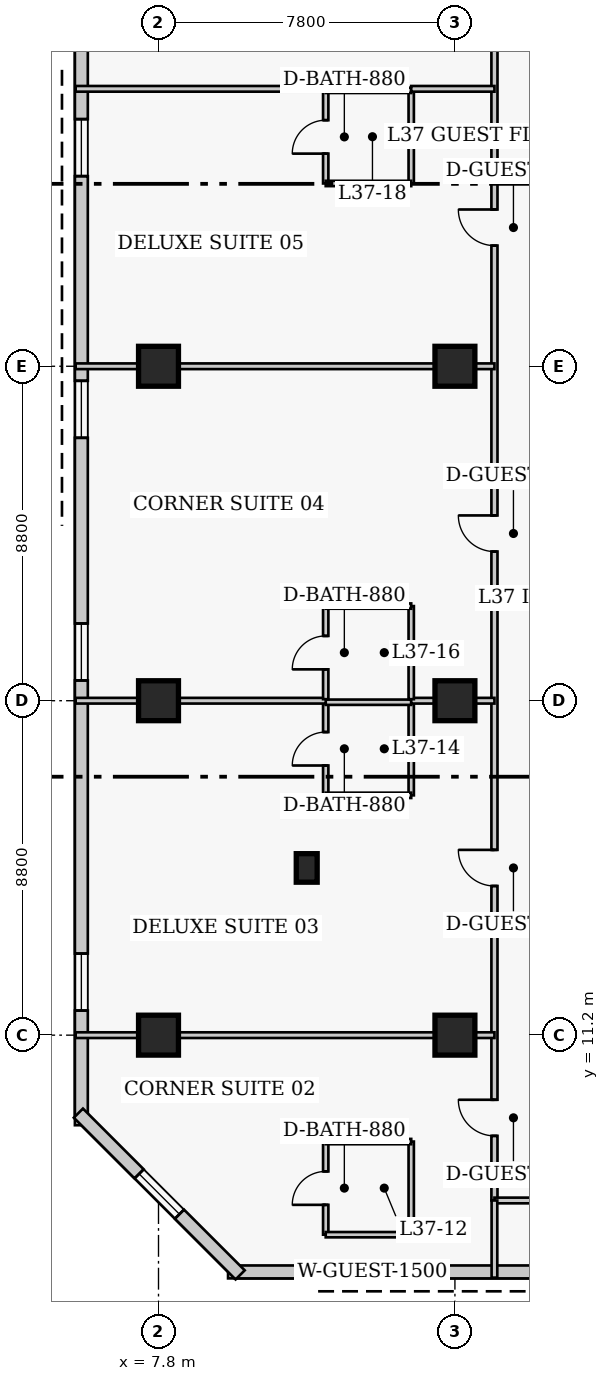
"""IFC4 building model, lengths in metres.
Left out: names, types, materials, properties, quantities, classifications, styles, units other than length and angle.
Written with IfcOpenShell. Run it as: python <this file> out.ifc"""

import sys

from ifc_helpers import new_model, si_unit, direction, frame, frame_2d, origin, origin_2d, place, context, subcontext, project, spatial, rectangle, extrude, element, fill, save


model = new_model("IFC4")
c1 = context("Model", 3, precision=1e-05, world=origin(), true_north=direction((0.0, 1.0)))
c2 = subcontext(c1, "Body", "Model", "MODEL_VIEW")
j1 = project(units=[si_unit("LENGTHUNIT", "METRE"), si_unit("PLANEANGLEUNIT", "RADIAN")], contexts=[c1])
p1 = place(None, origin())
s1 = spatial("IfcSite", under=j1, at=p1, CompositionType="ELEMENT")
p2 = place(p1, origin())
s2 = spatial("IfcBuilding", under=s1, at=p2, CompositionType="ELEMENT")
p3 = place(p2, frame((0.0, 0.0, 149.8)))
s3 = spatial("IfcBuildingStorey", under=s2, at=p3, CompositionType="ELEMENT", Elevation=149.8)
for number, where, z_axis, x_axis in (
    (1, (7.8, 11.2, 0.0), (0.0, 0.0, 1.0), (1.0, 0.0, 0.0)),
    (2, (7.8, 20.0, 0.0), (0.0, 0.0, 1.0), (1.0, 0.0, 0.0)),
    (3, (7.8, 28.8, 0.0), (0.0, 0.0, 1.0), (1.0, 0.0, 0.0)),
    (4, (15.6, 11.2, 0.0), (0.0, 0.0, 1.0), (1.0, 0.0, 0.0)),
    (5, (15.6, 20.0, 0.0), (0.0, 0.0, 1.0), (1.0, 0.0, 0.0)),
    (6, (15.6, 28.8, 0.0), (0.0, 0.0, 1.0), (1.0, 0.0, 0.0)),
):
    element("IfcColumn", number, at=place(p3, frame(where, z_axis=z_axis, x_axis=x_axis)), inside=s3, PredefinedType="COLUMN", context=c2, shape_type="SweptSolid", body=[
        extrude(rectangle(XDim=1.05, YDim=1.05, at=origin_2d()), origin(), (0.0, 0.0, 1.0), 3.8),
    ])
p4 = place(p3, frame((11.7, 15.6, 0.0), z_axis=(0.0, 0.0, 1.0), x_axis=(1.0, 0.0, 0.0)))
e7 = element("IfcColumn", 7, at=p4, inside=s3, PredefinedType="PILASTER", context=c2, shape_type="SweptSolid", body=[
    extrude(rectangle(XDim=0.55, YDim=0.75, at=origin_2d()), origin(), (0.0, 0.0, 1.0), 3.8),
])
p5 = place(p3, frame((9.63, 4.97, 0.0), z_axis=(0.0, 0.0, 1.0), x_axis=(1.0, 0.0, 0.0)))
e8 = element("IfcWall", 8, at=p5, inside=s3, PredefinedType="SOLIDWALL", context=c2, shape_type="SweptSolid", body=[
    extrude(rectangle(XDim=26.69, YDim=0.34, at=frame_2d((13.345, 0.0))), origin(), (0.0, 0.0, 1.0), 3.55),
])
p6 = place(p5, frame((3.048, 0.0, 0.85)))
e9 = element("IfcOpeningElement", 9, at=p6, cuts=e8, PredefinedType="OPENING", context=c2, shape_type="SweptSolid", body=[
    extrude(rectangle(XDim=1.5, YDim=1.75, at=frame_2d((0.75, 0.875))), frame((0.0, 0.18, 0.0), z_axis=(0.0, -1.0, 0.0), x_axis=(1.0, 0.0, 0.0)), (0.0, 0.0, 1.0), 0.36),
])
p7 = place(p5, frame((22.642, 0.0, 0.85)))
e10 = element("IfcOpeningElement", 10, at=p7, cuts=e8, PredefinedType="OPENING", context=c2, shape_type="SweptSolid", body=[
    extrude(rectangle(XDim=1.5, YDim=1.75, at=frame_2d((0.75, 0.875))), frame((0.0, 0.18, 0.0), z_axis=(0.0, -1.0, 0.0), x_axis=(1.0, 0.0, 0.0)), (0.0, 0.0, 1.0), 0.36),
])
p8 = place(p3, frame((5.77, 38.97, 0.0), z_axis=(0.0, 0.0, 1.0), x_axis=(0.0, -1.0, 0.0)))
e11 = element("IfcWall", 11, at=p8, inside=s3, PredefinedType="SOLIDWALL", context=c2, shape_type="SweptSolid", body=[
    extrude(rectangle(XDim=30.14, YDim=0.34, at=frame_2d((15.07, 0.0))), origin(), (0.0, 0.0, 1.0), 3.55),
])
p9 = place(p8, frame((3.667, 0.0, 0.85)))
e12 = element("IfcOpeningElement", 12, at=p9, cuts=e11, PredefinedType="OPENING", context=c2, shape_type="SweptSolid", body=[
    extrude(rectangle(XDim=1.5, YDim=1.75, at=frame_2d((0.75, 0.875))), frame((0.0, 0.18, 0.0), z_axis=(0.0, -1.0, 0.0), x_axis=(1.0, 0.0, 0.0)), (0.0, 0.0, 1.0), 0.36),
])
p10 = place(p8, frame((10.552, 0.0, 0.85)))
e13 = element("IfcOpeningElement", 13, at=p10, cuts=e11, PredefinedType="OPENING", context=c2, shape_type="SweptSolid", body=[
    extrude(rectangle(XDim=1.5, YDim=1.75, at=frame_2d((0.75, 0.875))), frame((0.0, 0.18, 0.0), z_axis=(0.0, -1.0, 0.0), x_axis=(1.0, 0.0, 0.0)), (0.0, 0.0, 1.0), 0.36),
])
p11 = place(p8, frame((16.938, 0.0, 0.85)))
e14 = element("IfcOpeningElement", 14, at=p11, cuts=e11, PredefinedType="OPENING", context=c2, shape_type="SweptSolid", body=[
    extrude(rectangle(XDim=1.5, YDim=1.75, at=frame_2d((0.75, 0.875))), frame((0.0, 0.18, 0.0), z_axis=(0.0, -1.0, 0.0), x_axis=(1.0, 0.0, 0.0)), (0.0, 0.0, 1.0), 0.36),
])
p12 = place(p8, frame((25.623, 0.0, 0.85)))
e15 = element("IfcOpeningElement", 15, at=p12, cuts=e11, PredefinedType="OPENING", context=c2, shape_type="SweptSolid", body=[
    extrude(rectangle(XDim=1.5, YDim=1.75, at=frame_2d((0.75, 0.875))), frame((0.0, 0.18, 0.0), z_axis=(0.0, -1.0, 0.0), x_axis=(1.0, 0.0, 0.0)), (0.0, 0.0, 1.0), 0.36),
])
p13 = place(p3, frame((5.692, 9.148, 0.0), z_axis=(0.0, 0.0, 1.0), x_axis=(0.707106781187, -0.707106781187, 0.0)))
e16 = element("IfcWall", 16, at=p13, inside=s3, PredefinedType="SOLIDWALL", context=c2, shape_type="SweptSolid", body=[
    extrude(rectangle(XDim=6.02, YDim=0.34, at=frame_2d((3.01, 0.0))), origin(), (0.0, 0.0, 1.0), 3.55),
])
p14 = place(p13, frame((2.26, 0.0, 0.85)))
e17 = element("IfcOpeningElement", 17, at=p14, cuts=e16, PredefinedType="OPENING", context=c2, shape_type="SweptSolid", body=[
    extrude(rectangle(XDim=1.5, YDim=1.75, at=frame_2d((0.75, 0.875))), frame((0.0, 0.18, 0.0), z_axis=(0.0, -1.0, 0.0), x_axis=(1.0, 0.0, 0.0)), (0.0, 0.0, 1.0), 0.36),
])
p15 = place(p3, frame((16.64, 6.85, 0.0), z_axis=(0.0, 0.0, 1.0), x_axis=(0.0, 1.0, 0.0)))
e18 = element("IfcWall", 18, at=p15, inside=s3, PredefinedType="PARTITIONING", context=c2, shape_type="SweptSolid", body=[
    extrude(rectangle(XDim=33.8, YDim=0.16, at=frame_2d((16.9, 0.0))), origin(), (0.0, 0.0, 1.0), 3.55),
])
p16 = place(p15, frame((1.7, 0.0, 0.0)))
e19 = element("IfcOpeningElement", 19, at=p16, cuts=e18, PredefinedType="OPENING", context=c2, shape_type="SweptSolid", body=[
    extrude(rectangle(XDim=0.95, YDim=2.1, at=frame_2d((0.475, 1.05))), frame((0.0, 0.09, 0.0), z_axis=(0.0, -1.0, 0.0), x_axis=(1.0, 0.0, 0.0)), (0.0, 0.0, 1.0), 0.18),
])
p17 = place(p15, frame((8.275, 0.0, 0.0)))
e20 = element("IfcOpeningElement", 20, at=p17, cuts=e18, PredefinedType="OPENING", context=c2, shape_type="SweptSolid", body=[
    extrude(rectangle(XDim=0.95, YDim=2.1, at=frame_2d((0.475, 1.05))), frame((0.0, 0.09, 0.0), z_axis=(0.0, -1.0, 0.0), x_axis=(1.0, 0.0, 0.0)), (0.0, 0.0, 1.0), 0.18),
])
p18 = place(p15, frame((17.075, 0.0, 0.0)))
e21 = element("IfcOpeningElement", 21, at=p18, cuts=e18, PredefinedType="OPENING", context=c2, shape_type="SweptSolid", body=[
    extrude(rectangle(XDim=0.95, YDim=2.1, at=frame_2d((0.475, 1.05))), frame((0.0, 0.09, 0.0), z_axis=(0.0, -1.0, 0.0), x_axis=(1.0, 0.0, 0.0)), (0.0, 0.0, 1.0), 0.18),
])
p19 = place(p15, frame((25.125, 0.0, 0.0)))
e22 = element("IfcOpeningElement", 22, at=p19, cuts=e18, PredefinedType="OPENING", context=c2, shape_type="SweptSolid", body=[
    extrude(rectangle(XDim=0.95, YDim=2.1, at=frame_2d((0.475, 1.05))), frame((0.0, 0.09, 0.0), z_axis=(0.0, -1.0, 0.0), x_axis=(1.0, 0.0, 0.0)), (0.0, 0.0, 1.0), 0.18),
])
p20 = place(p15, frame((32.36, 0.0, 0.0)))
e23 = element("IfcOpeningElement", 23, at=p20, cuts=e18, PredefinedType="OPENING", context=c2, shape_type="SweptSolid", body=[
    extrude(rectangle(XDim=1.0, YDim=2.15, at=frame_2d((0.5, 1.075))), frame((0.0, 0.09, 0.0), z_axis=(0.0, -1.0, 0.0), x_axis=(1.0, 0.0, 0.0)), (0.0, 0.0, 1.0), 0.18),
])
p21 = place(p3, frame((16.64, 6.85, 0.0), z_axis=(0.0, 0.0, 1.0), x_axis=(1.0, 0.0, 0.0)))
e24 = element("IfcWall", 24, at=p21, inside=s3, PredefinedType="PARTITIONING", context=c2, shape_type="SweptSolid", body=[
    extrude(rectangle(XDim=2.22, YDim=0.15, at=frame_2d((1.11, 0.0))), origin(), (0.0, 0.0, 1.0), 3.55),
])
p22 = place(p3, frame((16.64, 4.82, 0.0), z_axis=(0.0, 0.0, 1.0), x_axis=(0.0, 1.0, 0.0)))
e25 = element("IfcWall", 25, at=p22, inside=s3, PredefinedType="PARTITIONING", context=c2, shape_type="SweptSolid", body=[
    extrude(rectangle(XDim=2.03, YDim=0.15, at=frame_2d((1.015, 0.0))), origin(), (0.0, 0.0, 1.0), 3.55),
])
p23 = place(p3, frame((12.2, 5.95, 0.0), z_axis=(0.0, 0.0, 1.0), x_axis=(0.0, 1.0, 0.0)))
e26 = element("IfcWall", 26, at=p23, inside=s3, PredefinedType="PLUMBINGWALL", context=c2, shape_type="SweptSolid", body=[
    extrude(rectangle(XDim=2.45, YDim=0.14, at=frame_2d((1.225, 0.0))), origin(), (0.0, 0.0, 1.0), 3.55),
])
p24 = place(p23, frame((0.785, 0.0, 0.0)))
e27 = element("IfcOpeningElement", 27, at=p24, cuts=e26, PredefinedType="OPENING", context=c2, shape_type="SweptSolid", body=[
    extrude(rectangle(XDim=0.88, YDim=2.05, at=frame_2d((0.44, 1.025))), frame((0.0, 0.08, 0.0), z_axis=(0.0, -1.0, 0.0), x_axis=(1.0, 0.0, 0.0)), (0.0, 0.0, 1.0), 0.16),
])
p25 = place(p3, frame((14.45, 5.95, 0.0), z_axis=(0.0, 0.0, 1.0), x_axis=(0.0, 1.0, 0.0)))
e28 = element("IfcWall", 28, at=p25, inside=s3, PredefinedType="PLUMBINGWALL", context=c2, shape_type="SweptSolid", body=[
    extrude(rectangle(XDim=2.45, YDim=0.14, at=frame_2d((1.225, 0.0))), origin(), (0.0, 0.0, 1.0), 3.55),
])
for number, where, z_axis, x_axis in (
    (29, (12.2, 5.95, 0.0), (0.0, 0.0, 1.0), (1.0, 0.0, 0.0)),
    (30, (12.2, 8.4, 0.0), (0.0, 0.0, 1.0), (1.0, 0.0, 0.0)),
):
    element("IfcWall", number, at=place(p3, frame(where, z_axis=z_axis, x_axis=x_axis)), inside=s3, PredefinedType="PLUMBINGWALL", context=c2, shape_type="SweptSolid", body=[
        extrude(rectangle(XDim=2.25, YDim=0.14, at=frame_2d((1.125, 0.0))), origin(), (0.0, 0.0, 1.0), 3.55),
    ])
p26 = place(p3, frame((5.62, 11.2, 0.0), z_axis=(0.0, 0.0, 1.0), x_axis=(1.0, 0.0, 0.0)))
e31 = element("IfcWall", 31, at=p26, inside=s3, PredefinedType="PARTITIONING", context=c2, shape_type="SweptSolid", body=[
    extrude(rectangle(XDim=11.02, YDim=0.15, at=frame_2d((5.51, 0.0))), origin(), (0.0, 0.0, 1.0), 2.778),
])
p27 = place(p3, frame((12.2, 17.51, 0.0), z_axis=(0.0, 0.0, 1.0), x_axis=(0.0, 1.0, 0.0)))
e32 = element("IfcWall", 32, at=p27, inside=s3, PredefinedType="PLUMBINGWALL", context=c2, shape_type="SweptSolid", body=[
    extrude(rectangle(XDim=2.45, YDim=0.14, at=frame_2d((1.225, 0.0))), origin(), (0.0, 0.0, 1.0), 3.55),
])
p28 = place(p27, frame((0.785, 0.0, 0.0)))
e33 = element("IfcOpeningElement", 33, at=p28, cuts=e32, PredefinedType="OPENING", context=c2, shape_type="SweptSolid", body=[
    extrude(rectangle(XDim=0.88, YDim=2.05, at=frame_2d((0.44, 1.025))), frame((0.0, 0.08, 0.0), z_axis=(0.0, -1.0, 0.0), x_axis=(1.0, 0.0, 0.0)), (0.0, 0.0, 1.0), 0.16),
])
p29 = place(p3, frame((14.45, 17.51, 0.0), z_axis=(0.0, 0.0, 1.0), x_axis=(0.0, 1.0, 0.0)))
e34 = element("IfcWall", 34, at=p29, inside=s3, PredefinedType="PLUMBINGWALL", context=c2, shape_type="SweptSolid", body=[
    extrude(rectangle(XDim=2.45, YDim=0.14, at=frame_2d((1.225, 0.0))), origin(), (0.0, 0.0, 1.0), 3.55),
])
p30 = place(p3, frame((12.2, 17.51, 0.0), z_axis=(0.0, 0.0, 1.0), x_axis=(1.0, 0.0, 0.0)))
e35 = element("IfcWall", 35, at=p30, inside=s3, PredefinedType="PLUMBINGWALL", context=c2, shape_type="SweptSolid", body=[
    extrude(rectangle(XDim=2.25, YDim=0.14, at=frame_2d((1.125, 0.0))), origin(), (0.0, 0.0, 1.0), 3.55),
])
p31 = place(p3, frame((12.2, 19.96, 0.0), z_axis=(0.0, 0.0, 1.0), x_axis=(1.0, 0.0, 0.0)))
e36 = element("IfcWall", 36, at=p31, inside=s3, PredefinedType="PLUMBINGWALL", context=c2, shape_type="SweptSolid", body=[
    extrude(rectangle(XDim=2.25, YDim=0.14, at=frame_2d((1.125, 0.0))), origin(), (0.0, 0.0, 1.0), 2.9),
])
p32 = place(p3, frame((5.62, 20.0, 0.0), z_axis=(0.0, 0.0, 1.0), x_axis=(1.0, 0.0, 0.0)))
e37 = element("IfcWall", 37, at=p32, inside=s3, PredefinedType="PARTITIONING", context=c2, shape_type="SweptSolid", body=[
    extrude(rectangle(XDim=6.58, YDim=0.15, at=frame_2d((3.29, 0.0))), origin(), (0.0, 0.0, 1.0), 2.778),
])
p33 = place(p3, frame((14.45, 20.0, 0.0), z_axis=(0.0, 0.0, 1.0), x_axis=(1.0, 0.0, 0.0)))
e38 = element("IfcWall", 38, at=p33, inside=s3, PredefinedType="PARTITIONING", context=c2, shape_type="SweptSolid", body=[
    extrude(rectangle(XDim=2.19, YDim=0.15, at=frame_2d((1.095, 0.0))), origin(), (0.0, 0.0, 1.0), 2.778),
])
p34 = place(p3, frame((12.2, 20.04, 0.0), z_axis=(0.0, 0.0, 1.0), x_axis=(0.0, 1.0, 0.0)))
e39 = element("IfcWall", 39, at=p34, inside=s3, PredefinedType="PLUMBINGWALL", context=c2, shape_type="SweptSolid", body=[
    extrude(rectangle(XDim=2.45, YDim=0.14, at=frame_2d((1.225, 0.0))), origin(), (0.0, 0.0, 1.0), 3.55),
])
p35 = place(p34, frame((0.785, 0.0, 0.0)))
e40 = element("IfcOpeningElement", 40, at=p35, cuts=e39, PredefinedType="OPENING", context=c2, shape_type="SweptSolid", body=[
    extrude(rectangle(XDim=0.88, YDim=2.05, at=frame_2d((0.44, 1.025))), frame((0.0, 0.08, 0.0), z_axis=(0.0, -1.0, 0.0), x_axis=(1.0, 0.0, 0.0)), (0.0, 0.0, 1.0), 0.16),
])
p36 = place(p3, frame((14.45, 20.04, 0.0), z_axis=(0.0, 0.0, 1.0), x_axis=(0.0, 1.0, 0.0)))
e41 = element("IfcWall", 41, at=p36, inside=s3, PredefinedType="PLUMBINGWALL", context=c2, shape_type="SweptSolid", body=[
    extrude(rectangle(XDim=2.45, YDim=0.14, at=frame_2d((1.225, 0.0))), origin(), (0.0, 0.0, 1.0), 3.55),
])
p37 = place(p3, frame((12.2, 22.49, 0.0), z_axis=(0.0, 0.0, 1.0), x_axis=(1.0, 0.0, 0.0)))
e42 = element("IfcWall", 42, at=p37, inside=s3, PredefinedType="PLUMBINGWALL", context=c2, shape_type="SweptSolid", body=[
    extrude(rectangle(XDim=2.25, YDim=0.14, at=frame_2d((1.125, 0.0))), origin(), (0.0, 0.0, 1.0), 3.55),
])
p38 = place(p3, frame((5.62, 28.8, 0.0), z_axis=(0.0, 0.0, 1.0), x_axis=(1.0, 0.0, 0.0)))
e43 = element("IfcWall", 43, at=p38, inside=s3, PredefinedType="PARTITIONING", context=c2, shape_type="SweptSolid", body=[
    extrude(rectangle(XDim=11.02, YDim=0.15, at=frame_2d((5.51, 0.0))), origin(), (0.0, 0.0, 1.0), 2.778),
])
p39 = place(p3, frame((12.2, 33.61, 0.0), z_axis=(0.0, 0.0, 1.0), x_axis=(0.0, 1.0, 0.0)))
e44 = element("IfcWall", 44, at=p39, inside=s3, PredefinedType="PLUMBINGWALL", context=c2, shape_type="SweptSolid", body=[
    extrude(rectangle(XDim=2.45, YDim=0.14, at=frame_2d((1.225, 0.0))), origin(), (0.0, 0.0, 1.0), 3.55),
])
p40 = place(p39, frame((0.785, 0.0, 0.0)))
e45 = element("IfcOpeningElement", 45, at=p40, cuts=e44, PredefinedType="OPENING", context=c2, shape_type="SweptSolid", body=[
    extrude(rectangle(XDim=0.88, YDim=2.05, at=frame_2d((0.44, 1.025))), frame((0.0, 0.08, 0.0), z_axis=(0.0, -1.0, 0.0), x_axis=(1.0, 0.0, 0.0)), (0.0, 0.0, 1.0), 0.16),
])
p41 = place(p3, frame((14.45, 33.61, 0.0), z_axis=(0.0, 0.0, 1.0), x_axis=(0.0, 1.0, 0.0)))
e46 = element("IfcWall", 46, at=p41, inside=s3, PredefinedType="PLUMBINGWALL", context=c2, shape_type="SweptSolid", body=[
    extrude(rectangle(XDim=2.45, YDim=0.14, at=frame_2d((1.225, 0.0))), origin(), (0.0, 0.0, 1.0), 3.55),
])
for number, where, z_axis, x_axis in (
    (47, (12.2, 33.61, 0.0), (0.0, 0.0, 1.0), (1.0, 0.0, 0.0)),
    (48, (12.2, 36.06, 0.0), (0.0, 0.0, 1.0), (1.0, 0.0, 0.0)),
):
    element("IfcWall", number, at=place(p3, frame(where, z_axis=z_axis, x_axis=x_axis)), inside=s3, PredefinedType="PLUMBINGWALL", context=c2, shape_type="SweptSolid", body=[
        extrude(rectangle(XDim=2.25, YDim=0.14, at=frame_2d((1.125, 0.0))), origin(), (0.0, 0.0, 1.0), 3.55),
    ])
p42 = place(p3, frame((5.62, 36.1, 0.0), z_axis=(0.0, 0.0, 1.0), x_axis=(1.0, 0.0, 0.0)))
e49 = element("IfcWall", 49, at=p42, inside=s3, PredefinedType="PARTITIONING", context=c2, shape_type="SweptSolid", body=[
    extrude(rectangle(XDim=6.58, YDim=0.15, at=frame_2d((3.29, 0.0))), origin(), (0.0, 0.0, 1.0), 3.55),
])
p43 = place(p3, frame((14.45, 36.1, 0.0), z_axis=(0.0, 0.0, 1.0), x_axis=(1.0, 0.0, 0.0)))
e50 = element("IfcWall", 50, at=p43, inside=s3, PredefinedType="PARTITIONING", context=c2, shape_type="SweptSolid", body=[
    extrude(rectangle(XDim=2.19, YDim=0.15, at=frame_2d((1.095, 0.0))), origin(), (0.0, 0.0, 1.0), 3.55),
])
p44 = place(p6, origin())
e51 = element("IfcWindow", 51, at=p44, inside=s3, PartitioningType="SINGLE_PANEL", PredefinedType="WINDOW", context=c2, shape_type="SweptSolid", body=[
    extrude(rectangle(XDim=1.5, YDim=1.75, at=frame_2d((0.75, 0.875))), frame((0.0, 0.03, 0.0), z_axis=(0.0, -1.0, 0.0), x_axis=(1.0, 0.0, 0.0)), (0.0, 0.0, 1.0), 0.06),
])
fill(e9, e51)
p45 = place(p9, origin())
e52 = element("IfcWindow", 52, at=p45, inside=s3, PartitioningType="SINGLE_PANEL", PredefinedType="WINDOW", context=c2, shape_type="SweptSolid", body=[
    extrude(rectangle(XDim=1.5, YDim=1.75, at=frame_2d((0.75, 0.875))), frame((0.0, 0.03, 0.0), z_axis=(0.0, -1.0, 0.0), x_axis=(1.0, 0.0, 0.0)), (0.0, 0.0, 1.0), 0.06),
])
fill(e12, e52)
p46 = place(p10, origin())
e53 = element("IfcWindow", 53, at=p46, inside=s3, PartitioningType="SINGLE_PANEL", PredefinedType="WINDOW", context=c2, shape_type="SweptSolid", body=[
    extrude(rectangle(XDim=1.5, YDim=1.75, at=frame_2d((0.75, 0.875))), frame((0.0, 0.03, 0.0), z_axis=(0.0, -1.0, 0.0), x_axis=(1.0, 0.0, 0.0)), (0.0, 0.0, 1.0), 0.06),
])
fill(e13, e53)
p47 = place(p11, origin())
e54 = element("IfcWindow", 54, at=p47, inside=s3, PartitioningType="SINGLE_PANEL", PredefinedType="WINDOW", context=c2, shape_type="SweptSolid", body=[
    extrude(rectangle(XDim=1.5, YDim=1.75, at=frame_2d((0.75, 0.875))), frame((0.0, 0.03, 0.0), z_axis=(0.0, -1.0, 0.0), x_axis=(1.0, 0.0, 0.0)), (0.0, 0.0, 1.0), 0.06),
])
fill(e14, e54)
p48 = place(p12, origin())
e55 = element("IfcWindow", 55, at=p48, inside=s3, PartitioningType="SINGLE_PANEL", PredefinedType="WINDOW", context=c2, shape_type="SweptSolid", body=[
    extrude(rectangle(XDim=1.5, YDim=1.75, at=frame_2d((0.75, 0.875))), frame((0.0, 0.03, 0.0), z_axis=(0.0, -1.0, 0.0), x_axis=(1.0, 0.0, 0.0)), (0.0, 0.0, 1.0), 0.06),
])
fill(e15, e55)
p49 = place(p14, origin())
e56 = element("IfcWindow", 56, at=p49, inside=s3, PartitioningType="SINGLE_PANEL", PredefinedType="WINDOW", context=c2, shape_type="SweptSolid", body=[
    extrude(rectangle(XDim=1.5, YDim=1.75, at=frame_2d((0.75, 0.875))), frame((0.0, 0.03, 0.0), z_axis=(0.0, -1.0, 0.0), x_axis=(1.0, 0.0, 0.0)), (0.0, 0.0, 1.0), 0.06),
])
fill(e17, e56)
p50 = place(p24, origin())
e57 = element("IfcDoor", 57, at=p50, inside=s3, OperationType="SINGLE_SWING_LEFT", PredefinedType="DOOR", context=c2, shape_type="SweptSolid", body=[
    extrude(rectangle(XDim=0.88, YDim=2.05, at=frame_2d((0.44, 1.025))), frame((0.0, 0.025, 0.0), z_axis=(0.0, -1.0, 0.0), x_axis=(1.0, 0.0, 0.0)), (0.0, 0.0, 1.0), 0.05),
])
fill(e27, e57)
p51 = place(p16, origin())
e58 = element("IfcDoor", 58, at=p51, inside=s3, OperationType="SINGLE_SWING_RIGHT", PredefinedType="DOOR", context=c2, shape_type="SweptSolid", body=[
    extrude(rectangle(XDim=0.95, YDim=2.1, at=frame_2d((0.475, 1.05))), frame((0.0, 0.025, 0.0), z_axis=(0.0, -1.0, 0.0), x_axis=(1.0, 0.0, 0.0)), (0.0, 0.0, 1.0), 0.05),
])
fill(e19, e58)
p52 = place(p28, origin())
e59 = element("IfcDoor", 59, at=p52, inside=s3, OperationType="SINGLE_SWING_LEFT", PredefinedType="DOOR", context=c2, shape_type="SweptSolid", body=[
    extrude(rectangle(XDim=0.88, YDim=2.05, at=frame_2d((0.44, 1.025))), frame((0.0, 0.025, 0.0), z_axis=(0.0, -1.0, 0.0), x_axis=(1.0, 0.0, 0.0)), (0.0, 0.0, 1.0), 0.05),
])
fill(e33, e59)
p53 = place(p17, origin())
e60 = element("IfcDoor", 60, at=p53, inside=s3, OperationType="SINGLE_SWING_RIGHT", PredefinedType="DOOR", context=c2, shape_type="SweptSolid", body=[
    extrude(rectangle(XDim=0.95, YDim=2.1, at=frame_2d((0.475, 1.05))), frame((0.0, 0.025, 0.0), z_axis=(0.0, -1.0, 0.0), x_axis=(1.0, 0.0, 0.0)), (0.0, 0.0, 1.0), 0.05),
])
fill(e20, e60)
p54 = place(p35, origin())
e61 = element("IfcDoor", 61, at=p54, inside=s3, OperationType="SINGLE_SWING_LEFT", PredefinedType="DOOR", context=c2, shape_type="SweptSolid", body=[
    extrude(rectangle(XDim=0.88, YDim=2.05, at=frame_2d((0.44, 1.025))), frame((0.0, 0.025, 0.0), z_axis=(0.0, -1.0, 0.0), x_axis=(1.0, 0.0, 0.0)), (0.0, 0.0, 1.0), 0.05),
])
fill(e40, e61)
p55 = place(p18, origin())
e62 = element("IfcDoor", 62, at=p55, inside=s3, OperationType="SINGLE_SWING_RIGHT", PredefinedType="DOOR", context=c2, shape_type="SweptSolid", body=[
    extrude(rectangle(XDim=0.95, YDim=2.1, at=frame_2d((0.475, 1.05))), frame((0.0, 0.025, 0.0), z_axis=(0.0, -1.0, 0.0), x_axis=(1.0, 0.0, 0.0)), (0.0, 0.0, 1.0), 0.05),
])
fill(e21, e62)
p56 = place(p40, origin())
e63 = element("IfcDoor", 63, at=p56, inside=s3, OperationType="SINGLE_SWING_LEFT", PredefinedType="DOOR", context=c2, shape_type="SweptSolid", body=[
    extrude(rectangle(XDim=0.88, YDim=2.05, at=frame_2d((0.44, 1.025))), frame((0.0, 0.025, 0.0), z_axis=(0.0, -1.0, 0.0), x_axis=(1.0, 0.0, 0.0)), (0.0, 0.0, 1.0), 0.05),
])
fill(e45, e63)
p57 = place(p19, origin())
e64 = element("IfcDoor", 64, at=p57, inside=s3, OperationType="SINGLE_SWING_RIGHT", PredefinedType="DOOR", context=c2, shape_type="SweptSolid", body=[
    extrude(rectangle(XDim=0.95, YDim=2.1, at=frame_2d((0.475, 1.05))), frame((0.0, 0.025, 0.0), z_axis=(0.0, -1.0, 0.0), x_axis=(1.0, 0.0, 0.0)), (0.0, 0.0, 1.0), 0.05),
])
fill(e22, e64)
save(model, sys.argv[1])
